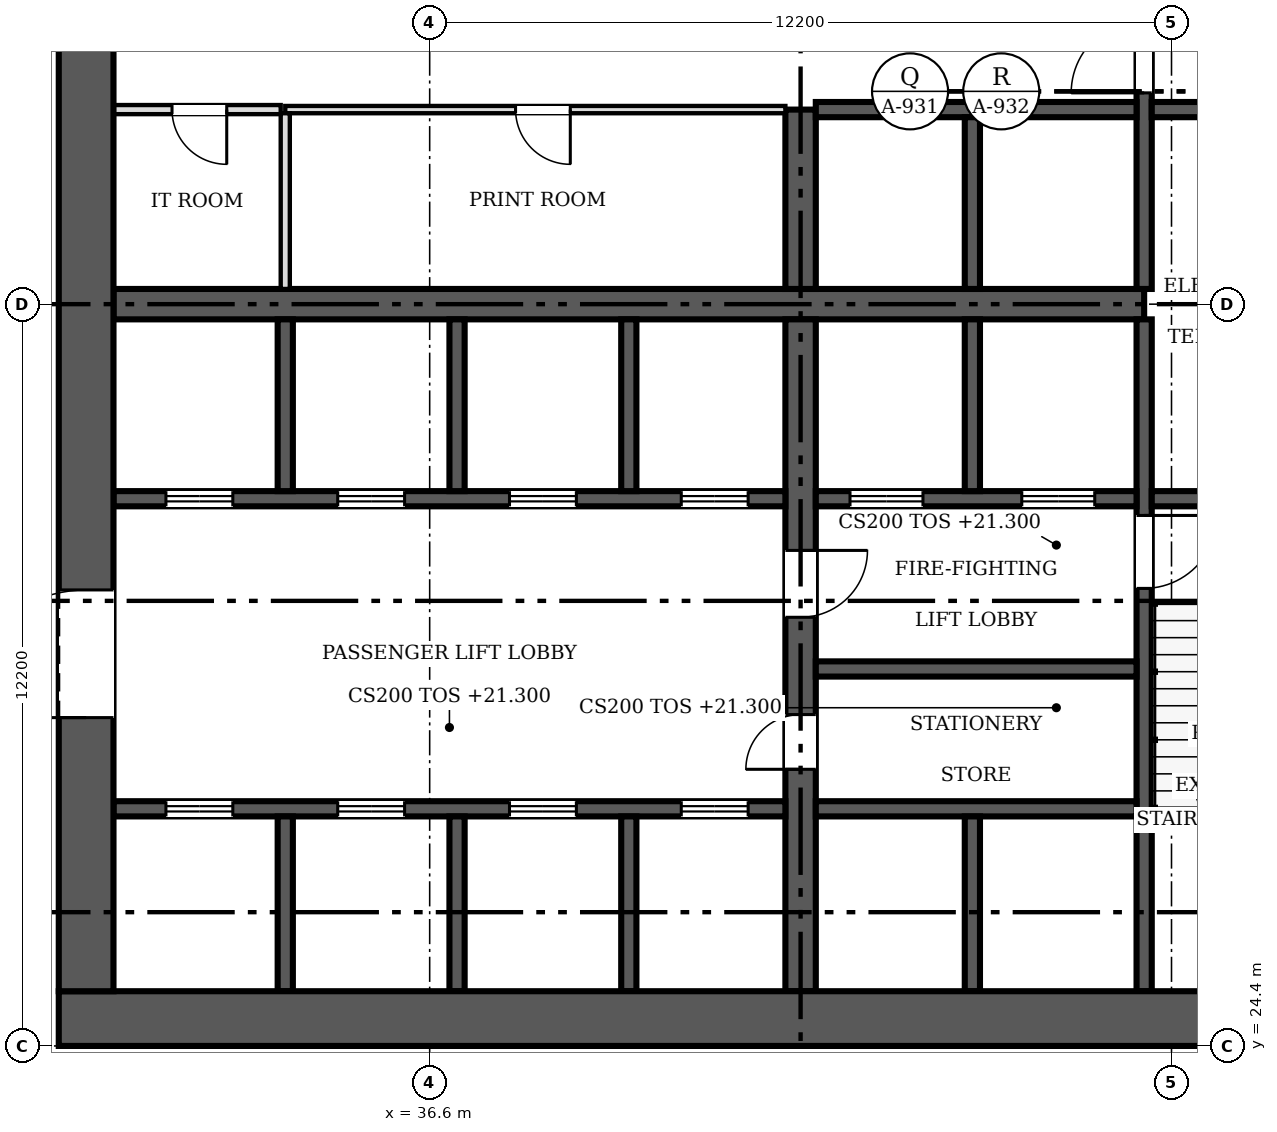
"""IFC4 building model, lengths in metres.
Left out: names, types, materials, properties, quantities, classifications, styles, units other than length and angle.
Written with IfcOpenShell. Run it as: python <this file> out.ifc"""

import sys

from ifc_helpers import new_model, si_unit, direction, frame, frame_2d, origin, place, context, subcontext, project, spatial, rectangle, extrude, source, transform, mapped, element, fill, save


model = new_model("IFC4")
c1 = context("Model", 3, precision=1e-05, world=origin(), true_north=direction((0.0, 1.0)))
c2 = subcontext(c1, "Body", "Model", "MODEL_VIEW")
j1 = project(units=[si_unit("LENGTHUNIT", "METRE"), si_unit("PLANEANGLEUNIT", "RADIAN")], contexts=[c1])
p1 = place(None, origin())
s1 = spatial("IfcSite", under=j1, at=p1, CompositionType="ELEMENT")
p2 = place(p1, origin())
s2 = spatial("IfcBuilding", under=s1, at=p2, CompositionType="ELEMENT")
p3 = place(p2, frame((0.0, 0.0, 21.3)))
s3 = spatial("IfcBuildingStorey", under=s2, at=p3, CompositionType="ELEMENT", Elevation=21.3)
p4 = place(p3, frame((54.9, 24.85, 0.0), z_axis=(0.0, 0.0, 1.0), x_axis=(-1.0, 0.0, 0.0)))
e1 = element("IfcWall", 1, at=p4, inside=s3, PredefinedType="SHEAR", context=c2, shape_type="SweptSolid", body=[
    extrude(rectangle(XDim=24.4, YDim=0.9, at=frame_2d((12.2, 0.0))), origin(), (0.0, 0.0, 1.0), 4.5),
])
m1 = source(origin(), c2, "Body", "SweptSolid", [
    extrude(rectangle(XDim=1.2, YDim=2.1, at=frame_2d((0.6, 1.05))), frame((0.0, 0.46, 0.0), z_axis=(0.0, -1.0, 0.0), x_axis=(1.0, 0.0, 0.0)), (0.0, 0.0, 1.0), 0.92),
])
p5 = place(p4, frame((1.5, 0.0, 0.0)))
e2 = element("IfcOpeningElement", 2, at=p5, cuts=e1, PredefinedType="OPENING", context=c2, shape_type="MappedRepresentation", body=[
    mapped(m1, transform((0.0, 0.0, 0.0), scale=1.0)),
])
p6 = place(p3, frame((30.95, 25.3, 0.0), z_axis=(0.0, 0.0, 1.0), x_axis=(0.0, 1.0, 0.0)))
e3 = element("IfcWall", 3, at=p6, inside=s3, PredefinedType="SHEAR", context=c2, shape_type="SweptSolid", body=[
    extrude(rectangle(XDim=22.6, YDim=0.9, at=frame_2d((11.3, 0.0))), origin(), (0.0, 0.0, 1.0), 4.5),
])
m2 = source(origin(), c2, "Body", "SweptSolid", [
    extrude(rectangle(XDim=2.1, YDim=2.4, at=frame_2d((1.05, 1.2))), frame((0.0, 0.46, 0.0), z_axis=(0.0, -1.0, 0.0), x_axis=(1.0, 0.0, 0.0)), (0.0, 0.0, 1.0), 0.92),
])
p7 = place(p6, frame((4.5, 0.0, 0.0)))
e4 = element("IfcOpeningElement", 4, at=p7, cuts=e3, PredefinedType="OPENING", context=c2, shape_type="MappedRepresentation", body=[
    mapped(m2, transform((0.0, 0.0, 0.0), scale=1.0)),
])
p8 = place(p6, frame((16.0, 0.0, 0.0)))
e5 = element("IfcOpeningElement", 5, at=p8, cuts=e3, PredefinedType="OPENING", context=c2, shape_type="MappedRepresentation", body=[
    mapped(m2, transform((0.0, 0.0, 0.0), scale=1.0)),
])
p9 = place(p3, frame((31.4, 36.6, 0.0), z_axis=(0.0, 0.0, 1.0), x_axis=(1.0, 0.0, 0.0)))
e6 = element("IfcWall", 6, at=p9, inside=s3, PredefinedType="SHEAR", context=c2, shape_type="SweptSolid", body=[
    extrude(rectangle(XDim=16.95, YDim=0.5, at=frame_2d((8.475, 0.0))), origin(), (0.0, 0.0, 1.0), 4.5),
])
p10 = place(p3, frame((42.7, 36.35, 0.0), z_axis=(0.0, 0.0, 1.0), x_axis=(0.0, -1.0, 0.0)))
e7 = element("IfcWall", 7, at=p10, inside=s3, PredefinedType="SHEAR", context=c2, shape_type="SweptSolid", body=[
    extrude(rectangle(XDim=11.05, YDim=0.5, at=frame_2d((5.525, 0.0))), origin(), (0.0, 0.0, 1.0), 4.5),
])
m3 = source(origin(), c2, "Body", "SweptSolid", [
    extrude(rectangle(XDim=0.9, YDim=2.1, at=frame_2d((0.45, 1.05))), frame((0.0, 0.26, 0.0), z_axis=(0.0, -1.0, 0.0), x_axis=(1.0, 0.0, 0.0)), (0.0, 0.0, 1.0), 0.52),
])
p11 = place(p10, frame((6.5, 0.0, 0.0)))
e8 = element("IfcOpeningElement", 8, at=p11, cuts=e7, PredefinedType="OPENING", context=c2, shape_type="MappedRepresentation", body=[
    mapped(m3, transform((0.0, 0.0, 0.0), scale=1.0)),
])
m4 = source(origin(), c2, "Body", "SweptSolid", [
    extrude(rectangle(XDim=1.1, YDim=2.1, at=frame_2d((0.55, 1.05))), frame((0.0, 0.26, 0.0), z_axis=(0.0, -1.0, 0.0), x_axis=(1.0, 0.0, 0.0)), (0.0, 0.0, 1.0), 0.52),
])
p12 = place(p10, frame((3.8, 0.0, 0.0)))
e9 = element("IfcOpeningElement", 9, at=p12, cuts=e7, PredefinedType="OPENING", context=c2, shape_type="MappedRepresentation", body=[
    mapped(m4, transform((0.0, 0.0, 0.0), scale=1.0)),
])
p13 = place(p3, frame((42.7, 36.85, 0.0), z_axis=(0.0, 0.0, 1.0), x_axis=(0.0, 1.0, 0.0)))
e10 = element("IfcWall", 10, at=p13, inside=s3, PredefinedType="SHEAR", context=c2, shape_type="SweptSolid", body=[
    extrude(rectangle(XDim=2.95, YDim=0.5, at=frame_2d((1.475, 0.0))), origin(), (0.0, 0.0, 1.0), 4.5),
])
p14 = place(p3, frame((48.35, 36.35, 0.0), z_axis=(0.0, 0.0, 1.0), x_axis=(0.0, -1.0, 0.0)))
e11 = element("IfcWall", 11, at=p14, inside=s3, PredefinedType="SOLIDWALL", context=c2, shape_type="SweptSolid", body=[
    extrude(rectangle(XDim=11.05, YDim=0.25, at=frame_2d((5.525, 0.0))), origin(), (0.0, 0.0, 1.0), 4.5),
])
m5 = source(origin(), c2, "Body", "SweptSolid", [
    extrude(rectangle(XDim=1.2, YDim=2.1, at=frame_2d((0.6, 1.05))), frame((0.0, 0.135, 0.0), z_axis=(0.0, -1.0, 0.0), x_axis=(1.0, 0.0, 0.0)), (0.0, 0.0, 1.0), 0.27),
])
p15 = place(p14, frame((3.225, 0.0, 0.0)))
e12 = element("IfcOpeningElement", 12, at=p15, cuts=e11, PredefinedType="OPENING", context=c2, shape_type="MappedRepresentation", body=[
    mapped(m5, transform((0.0, 0.0, 0.0), scale=1.0)),
])
p16 = place(p3, frame((48.35, 47.9, 0.0), z_axis=(0.0, 0.0, 1.0), x_axis=(0.0, -1.0, 0.0)))
e13 = element("IfcWall", 13, at=p16, inside=s3, PredefinedType="SOLIDWALL", context=c2, shape_type="SweptSolid", body=[
    extrude(rectangle(XDim=11.05, YDim=0.25, at=frame_2d((5.525, 0.0))), origin(), (0.0, 0.0, 1.0), 4.5),
])
p17 = place(p16, frame((6.625, 0.0, 0.0)))
e14 = element("IfcOpeningElement", 14, at=p17, cuts=e13, PredefinedType="OPENING", context=c2, shape_type="MappedRepresentation", body=[
    mapped(m5, transform((0.0, 0.0, 0.0), scale=1.0)),
])
p18 = place(p3, frame((42.45, 33.4, 0.0), z_axis=(0.0, 0.0, 1.0), x_axis=(-1.0, 0.0, 0.0)))
e15 = element("IfcWall", 15, at=p18, inside=s3, PredefinedType="SOLIDWALL", context=c2, shape_type="SweptSolid", body=[
    extrude(rectangle(XDim=11.05, YDim=0.25, at=frame_2d((5.525, 0.0))), origin(), (0.0, 0.0, 1.0), 4.5),
])
m6 = source(origin(), c2, "Body", "SweptSolid", [
    extrude(rectangle(XDim=1.1, YDim=2.1, at=frame_2d((0.55, 1.05))), frame((0.0, 0.135, 0.0), z_axis=(0.0, -1.0, 0.0), x_axis=(1.0, 0.0, 0.0)), (0.0, 0.0, 1.0), 0.27),
])
p19 = place(p18, frame((9.087, 0.0, 0.0)))
e16 = element("IfcOpeningElement", 16, at=p19, cuts=e15, PredefinedType="OPENING", context=c2, shape_type="MappedRepresentation", body=[
    mapped(m6, transform((0.0, 0.0, 0.0), scale=1.0)),
])
p20 = place(p18, frame((6.262, 0.0, 0.0)))
e17 = element("IfcOpeningElement", 17, at=p20, cuts=e15, PredefinedType="OPENING", context=c2, shape_type="MappedRepresentation", body=[
    mapped(m6, transform((0.0, 0.0, 0.0), scale=1.0)),
])
p21 = place(p18, frame((3.438, 0.0, 0.0)))
e18 = element("IfcOpeningElement", 18, at=p21, cuts=e15, PredefinedType="OPENING", context=c2, shape_type="MappedRepresentation", body=[
    mapped(m6, transform((0.0, 0.0, 0.0), scale=1.0)),
])
p22 = place(p18, frame((0.613, 0.0, 0.0)))
e19 = element("IfcOpeningElement", 19, at=p22, cuts=e15, PredefinedType="OPENING", context=c2, shape_type="MappedRepresentation", body=[
    mapped(m6, transform((0.0, 0.0, 0.0), scale=1.0)),
])
p23 = place(p3, frame((48.225, 33.4, 0.0), z_axis=(0.0, 0.0, 1.0), x_axis=(-1.0, 0.0, 0.0)))
e20 = element("IfcWall", 20, at=p23, inside=s3, PredefinedType="SOLIDWALL", context=c2, shape_type="SweptSolid", body=[
    extrude(rectangle(XDim=5.275, YDim=0.25, at=frame_2d((2.638, 0.0))), origin(), (0.0, 0.0, 1.0), 4.5),
])
p24 = place(p23, frame((3.512, 0.0, 0.0)))
e21 = element("IfcOpeningElement", 21, at=p24, cuts=e20, PredefinedType="OPENING", context=c2, shape_type="MappedRepresentation", body=[
    mapped(m5, transform((0.0, 0.0, 0.0), scale=1.0)),
])
p25 = place(p23, frame((0.688, 0.0, 0.0)))
e22 = element("IfcOpeningElement", 22, at=p25, cuts=e20, PredefinedType="OPENING", context=c2, shape_type="MappedRepresentation", body=[
    mapped(m5, transform((0.0, 0.0, 0.0), scale=1.0)),
])
p26 = place(p3, frame((48.475, 33.4, 0.0), z_axis=(0.0, 0.0, 1.0), x_axis=(1.0, 0.0, 0.0)))
e23 = element("IfcWall", 23, at=p26, inside=s3, PredefinedType="SOLIDWALL", context=c2, shape_type="SweptSolid", body=[
    extrude(rectangle(XDim=3.525, YDim=0.25, at=frame_2d((1.762, 0.0))), origin(), (0.0, 0.0, 1.0), 4.5),
])
p27 = place(p3, frame((31.4, 28.3, 0.0), z_axis=(0.0, 0.0, 1.0), x_axis=(1.0, 0.0, 0.0)))
e24 = element("IfcWall", 24, at=p27, inside=s3, PredefinedType="SOLIDWALL", context=c2, shape_type="SweptSolid", body=[
    extrude(rectangle(XDim=11.05, YDim=0.25, at=frame_2d((5.525, 0.0))), origin(), (0.0, 0.0, 1.0), 4.5),
])
p28 = place(p27, frame((0.863, 0.0, 0.0)))
e25 = element("IfcOpeningElement", 25, at=p28, cuts=e24, PredefinedType="OPENING", context=c2, shape_type="MappedRepresentation", body=[
    mapped(m6, transform((0.0, 0.0, 0.0), scale=1.0)),
])
p29 = place(p27, frame((3.688, 0.0, 0.0)))
e26 = element("IfcOpeningElement", 26, at=p29, cuts=e24, PredefinedType="OPENING", context=c2, shape_type="MappedRepresentation", body=[
    mapped(m6, transform((0.0, 0.0, 0.0), scale=1.0)),
])
p30 = place(p27, frame((6.512, 0.0, 0.0)))
e27 = element("IfcOpeningElement", 27, at=p30, cuts=e24, PredefinedType="OPENING", context=c2, shape_type="MappedRepresentation", body=[
    mapped(m6, transform((0.0, 0.0, 0.0), scale=1.0)),
])
p31 = place(p27, frame((9.337, 0.0, 0.0)))
e28 = element("IfcOpeningElement", 28, at=p31, cuts=e24, PredefinedType="OPENING", context=c2, shape_type="MappedRepresentation", body=[
    mapped(m6, transform((0.0, 0.0, 0.0), scale=1.0)),
])
for number, where, z_axis, x_axis in (
    (29, (42.95, 28.3, 0.0), (0.0, 0.0, 1.0), (1.0, 0.0, 0.0)),
    (30, (42.95, 39.8, 0.0), (0.0, 0.0, 1.0), (1.0, 0.0, 0.0)),
):
    element("IfcWall", number, at=place(p3, frame(where, z_axis=z_axis, x_axis=x_axis)), inside=s3, PredefinedType="SOLIDWALL", context=c2, shape_type="SweptSolid", body=[
        extrude(rectangle(XDim=5.275, YDim=0.25, at=frame_2d((2.638, 0.0))), origin(), (0.0, 0.0, 1.0), 4.5),
    ])
p32 = place(p3, frame((48.475, 39.8, 0.0), z_axis=(0.0, 0.0, 1.0), x_axis=(1.0, 0.0, 0.0)))
e31 = element("IfcWall", 31, at=p32, inside=s3, PredefinedType="SOLIDWALL", context=c2, shape_type="SweptSolid", body=[
    extrude(rectangle(XDim=3.525, YDim=0.25, at=frame_2d((1.762, 0.0))), origin(), (0.0, 0.0, 1.0), 4.5),
])
p33 = place(p3, frame((45.525, 33.525, 0.0), z_axis=(0.0, 0.0, 1.0), x_axis=(0.0, 1.0, 0.0)))
e32 = element("IfcWall", 32, at=p33, inside=s3, PredefinedType="SOLIDWALL", context=c2, shape_type="SweptSolid", body=[
    extrude(rectangle(XDim=2.825, YDim=0.25, at=frame_2d((1.413, 0.0))), origin(), (0.0, 0.0, 1.0), 4.5),
])
p34 = place(p3, frame((45.525, 36.85, 0.0), z_axis=(0.0, 0.0, 1.0), x_axis=(0.0, 1.0, 0.0)))
e33 = element("IfcWall", 33, at=p34, inside=s3, PredefinedType="SOLIDWALL", context=c2, shape_type="SweptSolid", body=[
    extrude(rectangle(XDim=2.825, YDim=0.25, at=frame_2d((1.413, 0.0))), origin(), (0.0, 0.0, 1.0), 4.5),
])
p35 = place(p3, frame((42.95, 30.6, 0.0), z_axis=(0.0, 0.0, 1.0), x_axis=(1.0, 0.0, 0.0)))
e34 = element("IfcWall", 34, at=p35, inside=s3, PredefinedType="SOLIDWALL", context=c2, shape_type="SweptSolid", body=[
    extrude(rectangle(XDim=5.275, YDim=0.25, at=frame_2d((2.638, 0.0))), origin(), (0.0, 0.0, 1.0), 4.5),
])
for number, where, z_axis, x_axis in (
    (35, (34.225, 33.525, 0.0), (0.0, 0.0, 1.0), (0.0, 1.0, 0.0)),
    (36, (37.05, 33.525, 0.0), (0.0, 0.0, 1.0), (0.0, 1.0, 0.0)),
    (37, (39.875, 33.525, 0.0), (0.0, 0.0, 1.0), (0.0, 1.0, 0.0)),
):
    element("IfcWall", number, at=place(p3, frame(where, z_axis=z_axis, x_axis=x_axis)), inside=s3, PredefinedType="SOLIDWALL", context=c2, shape_type="SweptSolid", body=[
        extrude(rectangle(XDim=2.825, YDim=0.25, at=frame_2d((1.413, 0.0))), origin(), (0.0, 0.0, 1.0), 4.5),
    ])
for number, where, z_axis, x_axis in (
    (38, (34.225, 25.3, 0.0), (0.0, 0.0, 1.0), (0.0, 1.0, 0.0)),
    (39, (37.05, 25.3, 0.0), (0.0, 0.0, 1.0), (0.0, 1.0, 0.0)),
    (40, (39.875, 25.3, 0.0), (0.0, 0.0, 1.0), (0.0, 1.0, 0.0)),
    (41, (45.525, 25.3, 0.0), (0.0, 0.0, 1.0), (0.0, 1.0, 0.0)),
):
    element("IfcWall", number, at=place(p3, frame(where, z_axis=z_axis, x_axis=x_axis)), inside=s3, PredefinedType="SOLIDWALL", context=c2, shape_type="SweptSolid", body=[
        extrude(rectangle(XDim=2.875, YDim=0.25, at=frame_2d((1.438, 0.0))), origin(), (0.0, 0.0, 1.0), 4.5),
    ])
p36 = place(p3, frame((42.45, 39.8, 0.0), z_axis=(0.0, 0.0, 1.0), x_axis=(-1.0, 0.0, 0.0)))
e42 = element("IfcWall", 42, at=p36, inside=s3, PredefinedType="PARTITIONING", context=c2, shape_type="SweptSolid", body=[
    extrude(rectangle(XDim=8.225, YDim=0.12, at=frame_2d((4.112, 0.0))), origin(), (0.0, 0.0, 1.0), 4.3),
])
m7 = source(origin(), c2, "Body", "SweptSolid", [
    extrude(rectangle(XDim=0.9, YDim=2.1, at=frame_2d((0.45, 1.05))), frame((0.0, 0.07, 0.0), z_axis=(0.0, -1.0, 0.0), x_axis=(1.0, 0.0, 0.0)), (0.0, 0.0, 1.0), 0.14),
])
p37 = place(p36, frame((3.538, 0.0, 0.0)))
e43 = element("IfcOpeningElement", 43, at=p37, cuts=e42, PredefinedType="OPENING", context=c2, shape_type="MappedRepresentation", body=[
    mapped(m7, transform((0.0, 0.0, 0.0), scale=1.0)),
])
p38 = place(p3, frame((34.225, 36.85, 0.0), z_axis=(0.0, 0.0, 1.0), x_axis=(0.0, 1.0, 0.0)))
e44 = element("IfcWall", 44, at=p38, inside=s3, PredefinedType="PARTITIONING", context=c2, shape_type="SweptSolid", body=[
    extrude(rectangle(XDim=2.89, YDim=0.15, at=frame_2d((1.445, 0.0))), origin(), (0.0, 0.0, 1.0), 4.3),
])
p39 = place(p3, frame((34.15, 39.8, 0.0), z_axis=(0.0, 0.0, 1.0), x_axis=(-1.0, 0.0, 0.0)))
e45 = element("IfcWall", 45, at=p39, inside=s3, PredefinedType="PARTITIONING", context=c2, shape_type="SweptSolid", body=[
    extrude(rectangle(XDim=2.75, YDim=0.15, at=frame_2d((1.375, 0.0))), origin(), (0.0, 0.0, 1.0), 4.3),
])
m8 = source(origin(), c2, "Body", "SweptSolid", [
    extrude(rectangle(XDim=0.9, YDim=2.1, at=frame_2d((0.45, 1.05))), frame((0.0, 0.085, 0.0), z_axis=(0.0, -1.0, 0.0), x_axis=(1.0, 0.0, 0.0)), (0.0, 0.0, 1.0), 0.17),
])
p40 = place(p39, frame((0.887, 0.0, 0.0)))
e46 = element("IfcOpeningElement", 46, at=p40, cuts=e45, PredefinedType="OPENING", context=c2, shape_type="MappedRepresentation", body=[
    mapped(m8, transform((0.0, 0.0, 0.0), scale=1.0)),
])
m9 = source(origin(), c2, "Body", "SweptSolid", [
    extrude(rectangle(XDim=2.1, YDim=2.4, at=frame_2d((1.05, 1.2))), frame((0.0, 0.025, 0.0), z_axis=(0.0, -1.0, 0.0), x_axis=(1.0, 0.0, 0.0)), (0.0, 0.0, 1.0), 0.05),
])
p41 = place(p7, origin())
e47 = element("IfcDoor", 47, at=p41, inside=s3, OperationType="DOUBLE_DOOR_SINGLE_SWING", PredefinedType="DOOR", context=c2, shape_type="MappedRepresentation", body=[
    mapped(m9, transform((0.0, 0.0, 0.0), scale=1.0)),
])
fill(e4, e47)
m10 = source(origin(), c2, "Body", "SweptSolid", [
    extrude(rectangle(XDim=0.9, YDim=2.1, at=frame_2d((0.45, 1.05))), frame((0.0, 0.025, 0.0), z_axis=(0.0, -1.0, 0.0), x_axis=(1.0, 0.0, 0.0)), (0.0, 0.0, 1.0), 0.05),
])
p42 = place(p11, origin())
e48 = element("IfcDoor", 48, at=p42, inside=s3, OperationType="SINGLE_SWING_RIGHT", PredefinedType="DOOR", context=c2, shape_type="MappedRepresentation", body=[
    mapped(m10, transform((0.0, 0.0, 0.0), scale=1.0)),
])
fill(e8, e48)
m11 = source(origin(), c2, "Body", "SweptSolid", [
    extrude(rectangle(XDim=1.1, YDim=2.1, at=frame_2d((0.55, 1.05))), frame((0.0, 0.025, 0.0), z_axis=(0.0, -1.0, 0.0), x_axis=(1.0, 0.0, 0.0)), (0.0, 0.0, 1.0), 0.05),
])
p43 = place(p12, origin())
e49 = element("IfcDoor", 49, at=p43, inside=s3, OperationType="SINGLE_SWING_LEFT", PredefinedType="DOOR", context=c2, shape_type="MappedRepresentation", body=[
    mapped(m11, transform((0.0, 0.0, 0.0), scale=1.0)),
])
fill(e9, e49)
m12 = source(origin(), c2, "Body", "SweptSolid", [
    extrude(rectangle(XDim=1.2, YDim=2.1, at=frame_2d((0.6, 1.05))), frame((0.0, 0.025, 0.0), z_axis=(0.0, -1.0, 0.0), x_axis=(1.0, 0.0, 0.0)), (0.0, 0.0, 1.0), 0.05),
])
p44 = place(p15, origin())
e50 = element("IfcDoor", 50, at=p44, inside=s3, OperationType="SINGLE_SWING_LEFT", PredefinedType="DOOR", context=c2, shape_type="MappedRepresentation", body=[
    mapped(m12, transform((0.0, 0.0, 0.0), scale=1.0)),
])
fill(e12, e50)
p45 = place(p17, origin())
e51 = element("IfcDoor", 51, at=p45, inside=s3, OperationType="SINGLE_SWING_RIGHT", PredefinedType="DOOR", context=c2, shape_type="MappedRepresentation", body=[
    mapped(m12, transform((0.0, 0.0, 0.0), scale=1.0)),
])
fill(e14, e51)
p46 = place(p19, origin())
e52 = element("IfcDoor", 52, at=p46, inside=s3, OperationType="DOUBLE_DOOR_SLIDING", PredefinedType="DOOR", context=c2, shape_type="MappedRepresentation", body=[
    mapped(m11, transform((0.0, 0.0, 0.0), scale=1.0)),
])
fill(e16, e52)
p47 = place(p20, origin())
e53 = element("IfcDoor", 53, at=p47, inside=s3, OperationType="DOUBLE_DOOR_SLIDING", PredefinedType="DOOR", context=c2, shape_type="MappedRepresentation", body=[
    mapped(m11, transform((0.0, 0.0, 0.0), scale=1.0)),
])
fill(e17, e53)
p48 = place(p21, origin())
e54 = element("IfcDoor", 54, at=p48, inside=s3, OperationType="DOUBLE_DOOR_SLIDING", PredefinedType="DOOR", context=c2, shape_type="MappedRepresentation", body=[
    mapped(m11, transform((0.0, 0.0, 0.0), scale=1.0)),
])
fill(e18, e54)
p49 = place(p22, origin())
e55 = element("IfcDoor", 55, at=p49, inside=s3, OperationType="DOUBLE_DOOR_SLIDING", PredefinedType="DOOR", context=c2, shape_type="MappedRepresentation", body=[
    mapped(m11, transform((0.0, 0.0, 0.0), scale=1.0)),
])
fill(e19, e55)
p50 = place(p24, origin())
e56 = element("IfcDoor", 56, at=p50, inside=s3, OperationType="DOUBLE_DOOR_SLIDING", PredefinedType="DOOR", context=c2, shape_type="MappedRepresentation", body=[
    mapped(m12, transform((0.0, 0.0, 0.0), scale=1.0)),
])
fill(e21, e56)
p51 = place(p25, origin())
e57 = element("IfcDoor", 57, at=p51, inside=s3, OperationType="DOUBLE_DOOR_SLIDING", PredefinedType="DOOR", context=c2, shape_type="MappedRepresentation", body=[
    mapped(m12, transform((0.0, 0.0, 0.0), scale=1.0)),
])
fill(e22, e57)
p52 = place(p28, origin())
e58 = element("IfcDoor", 58, at=p52, inside=s3, OperationType="DOUBLE_DOOR_SLIDING", PredefinedType="DOOR", context=c2, shape_type="MappedRepresentation", body=[
    mapped(m11, transform((0.0, 0.0, 0.0), scale=1.0)),
])
fill(e25, e58)
p53 = place(p29, origin())
e59 = element("IfcDoor", 59, at=p53, inside=s3, OperationType="DOUBLE_DOOR_SLIDING", PredefinedType="DOOR", context=c2, shape_type="MappedRepresentation", body=[
    mapped(m11, transform((0.0, 0.0, 0.0), scale=1.0)),
])
fill(e26, e59)
p54 = place(p30, origin())
e60 = element("IfcDoor", 60, at=p54, inside=s3, OperationType="DOUBLE_DOOR_SLIDING", PredefinedType="DOOR", context=c2, shape_type="MappedRepresentation", body=[
    mapped(m11, transform((0.0, 0.0, 0.0), scale=1.0)),
])
fill(e27, e60)
p55 = place(p31, origin())
e61 = element("IfcDoor", 61, at=p55, inside=s3, OperationType="DOUBLE_DOOR_SLIDING", PredefinedType="DOOR", context=c2, shape_type="MappedRepresentation", body=[
    mapped(m11, transform((0.0, 0.0, 0.0), scale=1.0)),
])
fill(e28, e61)
p56 = place(p37, origin())
e62 = element("IfcDoor", 62, at=p56, inside=s3, OperationType="SINGLE_SWING_LEFT", PredefinedType="DOOR", context=c2, shape_type="MappedRepresentation", body=[
    mapped(m10, transform((0.0, 0.0, 0.0), scale=1.0)),
])
fill(e43, e62)
p57 = place(p40, origin())
e63 = element("IfcDoor", 63, at=p57, inside=s3, OperationType="SINGLE_SWING_LEFT", PredefinedType="DOOR", context=c2, shape_type="MappedRepresentation", body=[
    mapped(m10, transform((0.0, 0.0, 0.0), scale=1.0)),
])
fill(e46, e63)
save(model, sys.argv[1])
